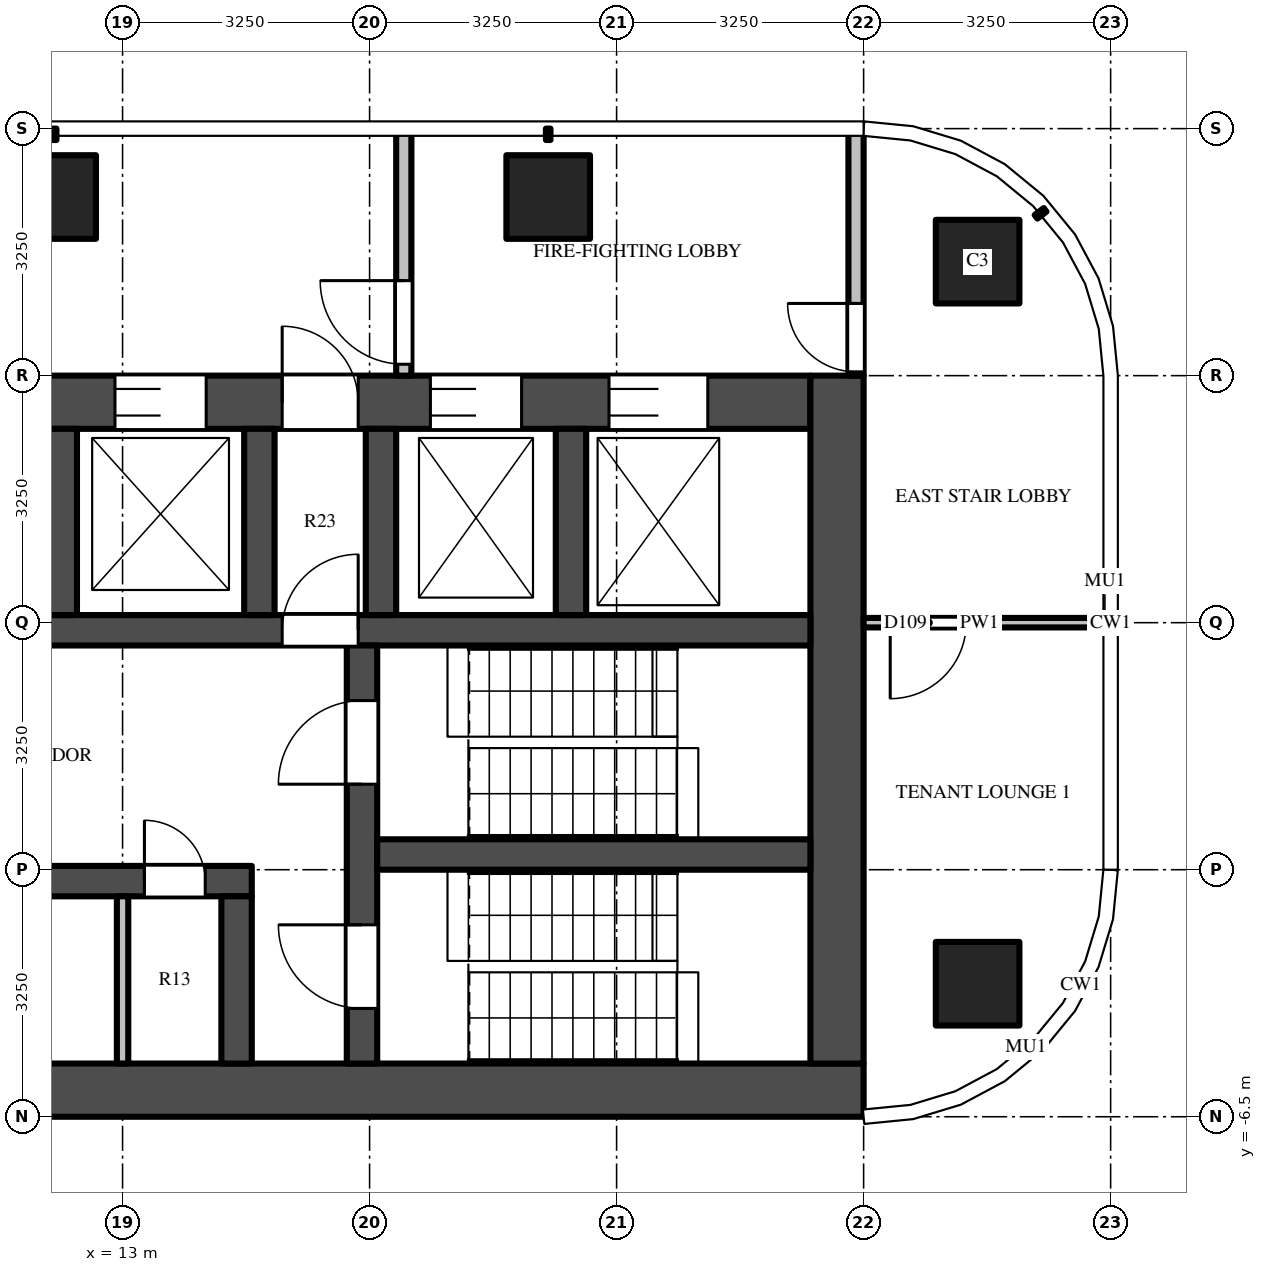
"""IFC4 building model, lengths in metres.
Left out: names, types, materials, properties, quantities, classifications, styles, units other than length and angle.
Written with IfcOpenShell. Run it as: python <this file> out.ifc"""

import sys

from ifc_helpers import new_model, si_unit, direction, frame, frame_2d, origin, origin_2d, place, context, subcontext, project, spatial, rectangle, extrude, source, transform, mapped, element, fill, save


model = new_model("IFC4")
c1 = context("Model", 3, precision=1e-05, world=origin(), true_north=direction((0.0, 1.0)))
c2 = subcontext(c1, "Body", "Model", "MODEL_VIEW")
j1 = project(units=[si_unit("LENGTHUNIT", "METRE"), si_unit("PLANEANGLEUNIT", "RADIAN")], contexts=[c1])
p1 = place(None, origin())
s1 = spatial("IfcSite", under=j1, at=p1, CompositionType="ELEMENT")
p2 = place(p1, origin())
s2 = spatial("IfcBuilding", under=s1, at=p2, CompositionType="ELEMENT")
p3 = place(p2, frame((0.0, 0.0, 255.8)))
s3 = spatial("IfcBuildingStorey", under=s2, at=p3, CompositionType="ELEMENT", Elevation=255.8)
m1 = source(origin(), c2, "Body", "SweptSolid", [
    extrude(rectangle(XDim=1.1, YDim=1.1, at=origin_2d()), origin(), (0.0, 0.0, 1.0), 3.9),
])
for number, where, z_axis, x_axis in (
    (1, (12.1, 5.6, 0.0), (0.0, 0.0, 1.0), (1.0, 0.0, 0.0)),
    (2, (18.6, 5.6, 0.0), (0.0, 0.0, 1.0), (1.0, 0.0, 0.0)),
    (3, (24.25, 4.75, 0.0), (0.0, 0.0, 1.0), (1.0, 0.0, 0.0)),
    (4, (24.25, -4.75, 0.0), (0.0, 0.0, 1.0), (1.0, 0.0, 0.0)),
):
    element("IfcColumn", number, at=place(p3, frame(where, z_axis=z_axis, x_axis=x_axis)), inside=s3, PredefinedType="COLUMN", context=c2, shape_type="MappedRepresentation", body=[
        mapped(m1, transform((0.0, 0.0, 0.0))),
    ])
m2 = source(origin(), c2, "Body", "SweptSolid", [
    extrude(rectangle(XDim=16.6, YDim=0.7, at=frame_2d((8.3, 0.0))), origin(), (0.0, 0.0, 1.0), 3.7),
])
p4 = place(p3, frame((6.15, -6.15, 0.0), z_axis=(0.0, 0.0, 1.0), x_axis=(1.0, 0.0, 0.0)))
e5 = element("IfcWall", 5, at=p4, inside=s3, PredefinedType="SHEAR", context=c2, shape_type="MappedRepresentation", body=[
    mapped(m2, transform((0.0, 0.0, 0.0))),
])
m3 = source(origin(), c2, "Body", "SweptSolid", [
    extrude(rectangle(XDim=14.85, YDim=0.7, at=frame_2d((7.425, 0.0))), origin(), (0.0, 0.0, 1.0), 3.7),
])
p5 = place(p3, frame((7.2, 2.9, 0.0), z_axis=(0.0, 0.0, 1.0), x_axis=(1.0, 0.0, 0.0)))
e6 = element("IfcWall", 6, at=p5, inside=s3, PredefinedType="SHEAR", context=c2, shape_type="MappedRepresentation", body=[
    mapped(m3, transform((0.0, 0.0, 0.0))),
])
m4 = source(origin(), c2, "Body", "SweptSolid", [
    extrude(rectangle(XDim=1.1, YDim=2.1, at=frame_2d((0.55, 1.05))), frame((0.0, 0.36, 0.0), z_axis=(0.0, -1.0, 0.0), x_axis=(1.0, 0.0, 0.0)), (0.0, 0.0, 1.0), 0.72),
])
p6 = place(p5, frame((0.55, 0.0, 0.0)))
e7 = element("IfcOpeningElement", 7, at=p6, cuts=e6, PredefinedType="OPENING", context=c2, shape_type="MappedRepresentation", body=[
    mapped(m4, transform((0.0, 0.0, 0.0))),
])
p7 = place(p5, frame((3.15, 0.0, 0.0)))
e8 = element("IfcOpeningElement", 8, at=p7, cuts=e6, PredefinedType="OPENING", context=c2, shape_type="MappedRepresentation", body=[
    mapped(m4, transform((0.0, 0.0, 0.0))),
])
m5 = source(origin(), c2, "Body", "SweptSolid", [
    extrude(rectangle(XDim=1.2, YDim=2.1, at=frame_2d((0.6, 1.05))), frame((0.0, 0.36, 0.0), z_axis=(0.0, -1.0, 0.0), x_axis=(1.0, 0.0, 0.0)), (0.0, 0.0, 1.0), 0.72),
])
p8 = place(p5, frame((5.7, 0.0, 0.0)))
e9 = element("IfcOpeningElement", 9, at=p8, cuts=e6, PredefinedType="OPENING", context=c2, shape_type="MappedRepresentation", body=[
    mapped(m5, transform((0.0, 0.0, 0.0))),
])
m6 = source(origin(), c2, "Body", "SweptSolid", [
    extrude(rectangle(XDim=1.3, YDim=2.1, at=frame_2d((0.65, 1.05))), frame((0.0, 0.36, 0.0), z_axis=(0.0, -1.0, 0.0), x_axis=(1.0, 0.0, 0.0)), (0.0, 0.0, 1.0), 0.72),
])
p9 = place(p5, frame((12.2, 0.0, 0.0)))
e10 = element("IfcOpeningElement", 10, at=p9, cuts=e6, PredefinedType="OPENING", context=c2, shape_type="MappedRepresentation", body=[
    mapped(m6, transform((0.0, 0.0, 0.0))),
])
p10 = place(p5, frame((9.85, 0.0, 0.0)))
e11 = element("IfcOpeningElement", 11, at=p10, cuts=e6, PredefinedType="OPENING", context=c2, shape_type="MappedRepresentation", body=[
    mapped(m5, transform((0.0, 0.0, 0.0))),
])
m7 = source(origin(), c2, "Body", "SweptSolid", [
    extrude(rectangle(XDim=1.0, YDim=2.1, at=frame_2d((0.5, 1.05))), frame((0.0, 0.36, 0.0), z_axis=(0.0, -1.0, 0.0), x_axis=(1.0, 0.0, 0.0)), (0.0, 0.0, 1.0), 0.72),
])
p11 = place(p5, frame((7.9, 0.0, 0.0)))
e12 = element("IfcOpeningElement", 12, at=p11, cuts=e6, PredefinedType="OPENING", context=c2, shape_type="MappedRepresentation", body=[
    mapped(m7, transform((0.0, 0.0, 0.0))),
])
m8 = source(origin(), c2, "Body", "SweptSolid", [
    extrude(rectangle(XDim=9.05, YDim=0.7, at=frame_2d((4.525, 0.0))), origin(), (0.0, 0.0, 1.0), 3.7),
])
p12 = place(p3, frame((22.4, -5.8, 0.0), z_axis=(0.0, 0.0, 1.0), x_axis=(0.0, 1.0, 0.0)))
e13 = element("IfcWall", 13, at=p12, inside=s3, PredefinedType="SHEAR", context=c2, shape_type="MappedRepresentation", body=[
    mapped(m8, transform((0.0, 0.0, 0.0))),
])
m9 = source(origin(), c2, "Body", "SweptSolid", [
    extrude(rectangle(XDim=7.5, YDim=0.4, at=frame_2d((3.75, 0.0))), origin(), (0.0, 0.0, 1.0), 3.7),
])
p13 = place(p3, frame((7.2, -3.4, 0.0), z_axis=(0.0, 0.0, 1.0), x_axis=(1.0, 0.0, 0.0)))
e14 = element("IfcWall", 14, at=p13, inside=s3, PredefinedType="SHEAR", context=c2, shape_type="MappedRepresentation", body=[
    mapped(m9, transform((0.0, 0.0, 0.0))),
])
m10 = source(origin(), c2, "Body", "SweptSolid", [
    extrude(rectangle(XDim=0.8, YDim=2.1, at=frame_2d((0.4, 1.05))), frame((0.0, 0.21, 0.0), z_axis=(0.0, -1.0, 0.0), x_axis=(1.0, 0.0, 0.0)), (0.0, 0.0, 1.0), 0.42),
])
p14 = place(p13, frame((0.212, 0.0, 0.0)))
e15 = element("IfcOpeningElement", 15, at=p14, cuts=e14, PredefinedType="OPENING", context=c2, shape_type="MappedRepresentation", body=[
    mapped(m10, transform((0.0, 0.0, 0.0))),
])
m11 = source(origin(), c2, "Body", "SweptSolid", [
    extrude(rectangle(XDim=1.0, YDim=2.1, at=frame_2d((0.5, 1.05))), frame((0.0, 0.21, 0.0), z_axis=(0.0, -1.0, 0.0), x_axis=(1.0, 0.0, 0.0)), (0.0, 0.0, 1.0), 0.42),
])
p15 = place(p13, frame((3.05, 0.0, 0.0)))
e16 = element("IfcOpeningElement", 16, at=p15, cuts=e14, PredefinedType="OPENING", context=c2, shape_type="MappedRepresentation", body=[
    mapped(m11, transform((0.0, 0.0, 0.0))),
])
p16 = place(p13, frame((6.087, 0.0, 0.0)))
e17 = element("IfcOpeningElement", 17, at=p16, cuts=e14, PredefinedType="OPENING", context=c2, shape_type="MappedRepresentation", body=[
    mapped(m10, transform((0.0, 0.0, 0.0))),
])
m12 = source(origin(), c2, "Body", "SweptSolid", [
    extrude(rectangle(XDim=14.85, YDim=0.4, at=frame_2d((7.425, 0.0))), origin(), (0.0, 0.0, 1.0), 3.7),
])
p17 = place(p3, frame((7.2, -0.1, 0.0), z_axis=(0.0, 0.0, 1.0), x_axis=(1.0, 0.0, 0.0)))
e18 = element("IfcWall", 18, at=p17, inside=s3, PredefinedType="SHEAR", context=c2, shape_type="MappedRepresentation", body=[
    mapped(m12, transform((0.0, 0.0, 0.0))),
])
p18 = place(p17, frame((7.9, 0.0, 0.0)))
e19 = element("IfcOpeningElement", 19, at=p18, cuts=e18, PredefinedType="OPENING", context=c2, shape_type="MappedRepresentation", body=[
    mapped(m11, transform((0.0, 0.0, 0.0))),
])
m13 = source(origin(), c2, "Body", "SweptSolid", [
    extrude(rectangle(XDim=5.5, YDim=0.4, at=frame_2d((2.75, 0.0))), origin(), (0.0, 0.0, 1.0), 3.7),
])
p19 = place(p3, frame((16.15, -5.8, 0.0), z_axis=(0.0, 0.0, 1.0), x_axis=(0.0, 1.0, 0.0)))
e20 = element("IfcWall", 20, at=p19, inside=s3, PredefinedType="SHEAR", context=c2, shape_type="MappedRepresentation", body=[
    mapped(m13, transform((0.0, 0.0, 0.0))),
])
m14 = source(origin(), c2, "Body", "SweptSolid", [
    extrude(rectangle(XDim=1.1, YDim=2.1, at=frame_2d((0.55, 1.05))), frame((0.0, 0.21, 0.0), z_axis=(0.0, -1.0, 0.0), x_axis=(1.0, 0.0, 0.0)), (0.0, 0.0, 1.0), 0.42),
])
p20 = place(p19, frame((0.725, 0.0, 0.0)))
e21 = element("IfcOpeningElement", 21, at=p20, cuts=e20, PredefinedType="OPENING", context=c2, shape_type="MappedRepresentation", body=[
    mapped(m14, transform((0.0, 0.0, 0.0))),
])
p21 = place(p19, frame((3.675, 0.0, 0.0)))
e22 = element("IfcOpeningElement", 22, at=p21, cuts=e20, PredefinedType="OPENING", context=c2, shape_type="MappedRepresentation", body=[
    mapped(m14, transform((0.0, 0.0, 0.0))),
])
m15 = source(origin(), c2, "Body", "SweptSolid", [
    extrude(rectangle(XDim=5.7, YDim=0.4, at=frame_2d((2.85, 0.0))), origin(), (0.0, 0.0, 1.0), 3.7),
])
p22 = place(p3, frame((16.35, -3.05, 0.0), z_axis=(0.0, 0.0, 1.0), x_axis=(1.0, 0.0, 0.0)))
e23 = element("IfcWall", 23, at=p22, inside=s3, PredefinedType="SHEAR", context=c2, shape_type="MappedRepresentation", body=[
    mapped(m15, transform((0.0, 0.0, 0.0))),
])
m16 = source(origin(), c2, "Body", "SweptSolid", [
    extrude(rectangle(XDim=2.2, YDim=0.4, at=frame_2d((1.1, 0.0))), origin(), (0.0, 0.0, 1.0), 3.7),
])
p23 = place(p3, frame((14.5, -5.8, 0.0), z_axis=(0.0, 0.0, 1.0), x_axis=(0.0, 1.0, 0.0)))
e24 = element("IfcWall", 24, at=p23, inside=s3, PredefinedType="SHEAR", context=c2, shape_type="MappedRepresentation", body=[
    mapped(m16, transform((0.0, 0.0, 0.0))),
])
m17 = source(origin(), c2, "Body", "SweptSolid", [
    extrude(rectangle(XDim=2.45, YDim=0.4, at=frame_2d((1.225, 0.0))), origin(), (0.0, 0.0, 1.0), 3.7),
])
for number, where, z_axis, x_axis in (
    (25, (12.2, 0.1, 0.0), (0.0, 0.0, 1.0), (0.0, 1.0, 0.0)),
    (26, (14.8, 0.1, 0.0), (0.0, 0.0, 1.0), (0.0, 1.0, 0.0)),
    (27, (16.4, 0.1, 0.0), (0.0, 0.0, 1.0), (0.0, 1.0, 0.0)),
    (28, (18.9, 0.1, 0.0), (0.0, 0.0, 1.0), (0.0, 1.0, 0.0)),
):
    element("IfcWall", number, at=place(p3, frame(where, z_axis=z_axis, x_axis=x_axis)), inside=s3, PredefinedType="SHEAR", context=c2, shape_type="MappedRepresentation", body=[
        mapped(m17, transform((0.0, 0.0, 0.0))),
    ])
m18 = source(origin(), c2, "Body", "SweptSolid", [
    extrude(rectangle(XDim=3.25, YDim=0.2, at=frame_2d((1.625, 0.0))), origin(), (0.0, 0.0, 1.0), 3.7),
])
p24 = place(p3, frame((16.7, 3.25, 0.0), z_axis=(0.0, 0.0, 1.0), x_axis=(0.0, 1.0, 0.0)))
e29 = element("IfcWall", 29, at=p24, inside=s3, PredefinedType="PARTITIONING", context=c2, shape_type="MappedRepresentation", body=[
    mapped(m18, transform((0.0, 0.0, 0.0))),
])
m19 = source(origin(), c2, "Body", "SweptSolid", [
    extrude(rectangle(XDim=1.1, YDim=2.1, at=frame_2d((0.55, 1.05))), frame((0.0, 0.11, 0.0), z_axis=(0.0, -1.0, 0.0), x_axis=(1.0, 0.0, 0.0)), (0.0, 0.0, 1.0), 0.22),
])
p25 = place(p24, frame((0.15, 0.0, 0.0)))
e30 = element("IfcOpeningElement", 30, at=p25, cuts=e29, PredefinedType="OPENING", context=c2, shape_type="MappedRepresentation", body=[
    mapped(m19, transform((0.0, 0.0, 0.0))),
])
p26 = place(p3, frame((22.65, 3.25, 0.0), z_axis=(0.0, 0.0, 1.0), x_axis=(0.0, 1.0, 0.0)))
e31 = element("IfcWall", 31, at=p26, inside=s3, PredefinedType="PARTITIONING", context=c2, shape_type="MappedRepresentation", body=[
    mapped(m18, transform((0.0, 0.0, 0.0))),
])
m20 = source(origin(), c2, "Body", "SweptSolid", [
    extrude(rectangle(XDim=0.9, YDim=2.1, at=frame_2d((0.45, 1.05))), frame((0.0, 0.11, 0.0), z_axis=(0.0, -1.0, 0.0), x_axis=(1.0, 0.0, 0.0)), (0.0, 0.0, 1.0), 0.22),
])
p27 = place(p26, frame((0.05, 0.0, 0.0)))
e32 = element("IfcOpeningElement", 32, at=p27, cuts=e31, PredefinedType="OPENING", context=c2, shape_type="MappedRepresentation", body=[
    mapped(m20, transform((0.0, 0.0, 0.0))),
])
m21 = source(origin(), c2, "Body", "SweptSolid", [
    extrude(rectangle(XDim=2.2, YDim=0.15, at=frame_2d((1.1, 0.0))), origin(), (0.0, 0.0, 1.0), 3.7),
])
p28 = place(p3, frame((13.0, -5.8, 0.0), z_axis=(0.0, 0.0, 1.0), x_axis=(0.0, 1.0, 0.0)))
e33 = element("IfcWall", 33, at=p28, inside=s3, PredefinedType="PARTITIONING", context=c2, shape_type="MappedRepresentation", body=[
    mapped(m21, transform((0.0, 0.0, 0.0))),
])
m22 = source(origin(), c2, "Body", "SweptSolid", [
    extrude(rectangle(XDim=3.05, YDim=0.125, at=frame_2d((1.525, 0.0))), origin(), (0.0, 0.0, 1.0), 2.78),
])
p29 = place(p3, frame((25.8, 0.0, 0.0), z_axis=(0.0, 0.0, 1.0), x_axis=(-1.0, 0.0, 0.0)))
e34 = element("IfcWall", 34, at=p29, inside=s3, PredefinedType="PARTITIONING", context=c2, shape_type="MappedRepresentation", body=[
    mapped(m22, transform((0.0, 0.0, 0.0))),
])
m23 = source(origin(), c2, "Body", "SweptSolid", [
    extrude(rectangle(XDim=1.0, YDim=2.1, at=frame_2d((0.5, 1.05))), frame((0.0, 0.073, 0.0), z_axis=(0.0, -1.0, 0.0), x_axis=(1.0, 0.0, 0.0)), (0.0, 0.0, 1.0), 0.145),
])
p30 = place(p29, frame((1.7, 0.0, 0.0)))
e35 = element("IfcOpeningElement", 35, at=p30, cuts=e34, PredefinedType="OPENING", context=c2, shape_type="MappedRepresentation", body=[
    mapped(m23, transform((0.0, 0.0, 0.0))),
])
m24 = source(origin(), c2, "Body", "SweptSolid", [
    extrude(rectangle(XDim=1.2, YDim=2.1, at=frame_2d((0.6, 1.05))), frame((0.0, -0.275, 0.0), z_axis=(0.0, -1.0, 0.0), x_axis=(1.0, 0.0, 0.0)), (0.0, 0.0, 1.0), 0.05),
])
p31 = place(p8, origin())
e36 = element("IfcDoor", 36, at=p31, inside=s3, OperationType="DOUBLE_DOOR_SLIDING", PredefinedType="DOOR", context=c2, shape_type="MappedRepresentation", body=[
    mapped(m24, transform((0.0, 0.0, 0.0))),
])
fill(e9, e36)
m25 = source(origin(), c2, "Body", "SweptSolid", [
    extrude(rectangle(XDim=1.3, YDim=2.1, at=frame_2d((0.65, 1.05))), frame((0.0, -0.275, 0.0), z_axis=(0.0, -1.0, 0.0), x_axis=(1.0, 0.0, 0.0)), (0.0, 0.0, 1.0), 0.05),
])
p32 = place(p9, origin())
e37 = element("IfcDoor", 37, at=p32, inside=s3, OperationType="DOUBLE_DOOR_SLIDING", PredefinedType="DOOR", context=c2, shape_type="MappedRepresentation", body=[
    mapped(m25, transform((0.0, 0.0, 0.0))),
])
fill(e10, e37)
p33 = place(p10, origin())
e38 = element("IfcDoor", 38, at=p33, inside=s3, OperationType="DOUBLE_DOOR_SLIDING", PredefinedType="DOOR", context=c2, shape_type="MappedRepresentation", body=[
    mapped(m24, transform((0.0, 0.0, 0.0))),
])
fill(e11, e38)
m26 = source(origin(), c2, "Body", "SweptSolid", [
    extrude(rectangle(XDim=1.1, YDim=2.1, at=frame_2d((0.55, 1.05))), frame((0.0, 0.025, 0.0), z_axis=(0.0, -1.0, 0.0), x_axis=(1.0, 0.0, 0.0)), (0.0, 0.0, 1.0), 0.05),
])
p34 = place(p20, origin())
e39 = element("IfcDoor", 39, at=p34, inside=s3, OperationType="SINGLE_SWING_RIGHT", PredefinedType="DOOR", context=c2, shape_type="MappedRepresentation", body=[
    mapped(m26, transform((0.0, 0.0, 0.0))),
])
fill(e21, e39)
p35 = place(p21, origin())
e40 = element("IfcDoor", 40, at=p35, inside=s3, OperationType="SINGLE_SWING_LEFT", PredefinedType="DOOR", context=c2, shape_type="MappedRepresentation", body=[
    mapped(m26, transform((0.0, 0.0, 0.0))),
])
fill(e22, e40)
m27 = source(origin(), c2, "Body", "SweptSolid", [
    extrude(rectangle(XDim=1.0, YDim=2.1, at=frame_2d((0.5, 1.05))), frame((0.0, 0.025, 0.0), z_axis=(0.0, -1.0, 0.0), x_axis=(1.0, 0.0, 0.0)), (0.0, 0.0, 1.0), 0.05),
])
p36 = place(p18, origin())
e41 = element("IfcDoor", 41, at=p36, inside=s3, OperationType="SINGLE_SWING_RIGHT", PredefinedType="DOOR", context=c2, shape_type="MappedRepresentation", body=[
    mapped(m27, transform((0.0, 0.0, 0.0))),
])
fill(e19, e41)
m28 = source(origin(), c2, "Body", "SweptSolid", [
    extrude(rectangle(XDim=1.0, YDim=2.1, at=frame_2d((0.5, 1.05))), frame((0.0, -0.275, 0.0), z_axis=(0.0, -1.0, 0.0), x_axis=(1.0, 0.0, 0.0)), (0.0, 0.0, 1.0), 0.05),
])
p37 = place(p11, origin())
e42 = element("IfcDoor", 42, at=p37, inside=s3, OperationType="SINGLE_SWING_LEFT", PredefinedType="DOOR", context=c2, shape_type="MappedRepresentation", body=[
    mapped(m28, transform((0.0, 0.0, 0.0))),
])
fill(e12, e42)
p38 = place(p25, origin())
e43 = element("IfcDoor", 43, at=p38, inside=s3, OperationType="SINGLE_SWING_RIGHT", PredefinedType="DOOR", context=c2, shape_type="MappedRepresentation", body=[
    mapped(m26, transform((0.0, 0.0, 0.0))),
])
fill(e30, e43)
m29 = source(origin(), c2, "Body", "SweptSolid", [
    extrude(rectangle(XDim=0.9, YDim=2.1, at=frame_2d((0.45, 1.05))), frame((0.0, 0.025, 0.0), z_axis=(0.0, -1.0, 0.0), x_axis=(1.0, 0.0, 0.0)), (0.0, 0.0, 1.0), 0.05),
])
p39 = place(p27, origin())
e44 = element("IfcDoor", 44, at=p39, inside=s3, OperationType="SINGLE_SWING_RIGHT", PredefinedType="DOOR", context=c2, shape_type="MappedRepresentation", body=[
    mapped(m29, transform((0.0, 0.0, 0.0))),
])
fill(e32, e44)
m30 = source(origin(), c2, "Body", "SweptSolid", [
    extrude(rectangle(XDim=0.8, YDim=2.1, at=frame_2d((0.4, 1.05))), frame((0.0, 0.025, 0.0), z_axis=(0.0, -1.0, 0.0), x_axis=(1.0, 0.0, 0.0)), (0.0, 0.0, 1.0), 0.05),
])
p40 = place(p16, origin())
e45 = element("IfcDoor", 45, at=p40, inside=s3, OperationType="SINGLE_SWING_LEFT", PredefinedType="DOOR", context=c2, shape_type="MappedRepresentation", body=[
    mapped(m30, transform((0.0, 0.0, 0.0))),
])
fill(e17, e45)
p41 = place(p30, origin())
e46 = element("IfcDoor", 46, at=p41, inside=s3, OperationType="SINGLE_SWING_RIGHT", PredefinedType="DOOR", context=c2, shape_type="MappedRepresentation", body=[
    mapped(m27, transform((0.0, 0.0, 0.0))),
])
fill(e35, e46)
save(model, sys.argv[1])
